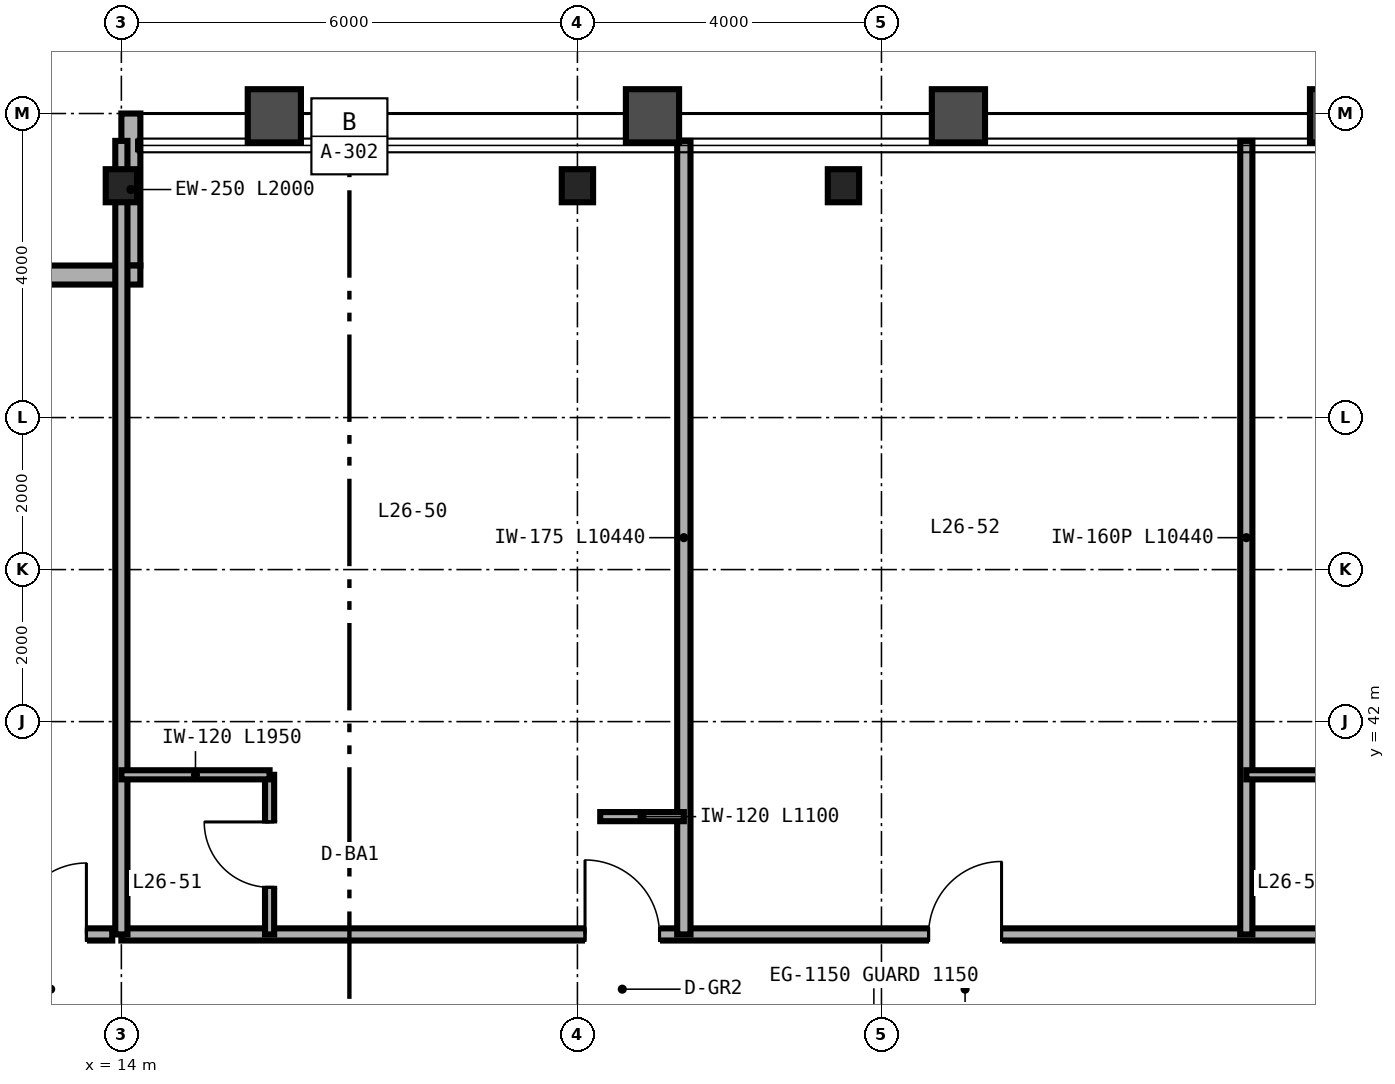
"""IFC4 building model, lengths in metres.
Left out: names, types, materials, properties, quantities, classifications, styles, units other than length and angle.
Written with IfcOpenShell. Run it as: python <this file> out.ifc"""

import sys

from ifc_helpers import new_model, si_unit, direction, frame, frame_2d, origin, origin_2d, place, context, subcontext, project, spatial, rectangle, i_section, extrude, source, transform, mapped, element, fill, save


model = new_model("IFC4")
c1 = context("Model", 3, precision=1e-05, world=origin(), true_north=direction((0.0, 1.0)))
c2 = subcontext(c1, "Body", "Model", "MODEL_VIEW")
j1 = project(units=[si_unit("LENGTHUNIT", "METRE"), si_unit("PLANEANGLEUNIT", "RADIAN")], contexts=[c1])
p1 = place(None, origin())
s1 = spatial("IfcSite", under=j1, at=p1, CompositionType="ELEMENT")
p2 = place(p1, origin())
s2 = spatial("IfcBuilding", under=s1, at=p2, CompositionType="ELEMENT")
p3 = place(p2, frame((0.0, 0.0, 108.0)))
s3 = spatial("IfcBuildingStorey", under=s2, at=p3, CompositionType="ELEMENT", Elevation=108.0)
m1 = source(origin(), c2, "Body", "SweptSolid", [
    extrude(i_section(OverallWidth=0.412, OverallDepth=0.435, WebThickness=0.036, FlangeThickness=0.057, FilletRadius=0.025, at=origin_2d()), origin(), (0.0, 0.0, 1.0), 3.36),
])
for number, where, z_axis, x_axis in (
    (1, (14.0, 49.05, 0.0), (0.0, 0.0, 1.0), (1.0, 0.0, 0.0)),
    (2, (20.0, 49.05, 0.0), (0.0, 0.0, 1.0), (1.0, 0.0, 0.0)),
    (3, (23.5, 49.05, 0.0), (0.0, 0.0, 1.0), (1.0, 0.0, 0.0)),
):
    element("IfcColumn", number, at=place(p3, frame(where, z_axis=z_axis, x_axis=x_axis)), inside=s3, PredefinedType="COLUMN", context=c2, shape_type="MappedRepresentation", body=[
        mapped(m1, transform((0.0, 0.0, 0.0), scale=1.0)),
    ])
p4 = place(p3, frame((14.125, 50.0, 0.0), z_axis=(0.0, 0.0, 1.0), x_axis=(0.0, -1.0, 0.0)))
e4 = element("IfcWall", 4, at=p4, inside=s3, PredefinedType="SOLIDWALL", context=c2, shape_type="SweptSolid", body=[
    extrude(rectangle(XDim=2.0, YDim=0.25, at=frame_2d((1.0, 0.0))), origin(), (0.0, 0.0, 1.0), 2.667),
])
p5 = place(p3, frame((14.25, 47.875, 0.0), z_axis=(0.0, 0.0, 1.0), x_axis=(-1.0, 0.0, 0.0)))
e5 = element("IfcWall", 5, at=p5, inside=s3, PredefinedType="SOLIDWALL", context=c2, shape_type="SweptSolid", body=[
    extrude(rectangle(XDim=2.0, YDim=0.25, at=frame_2d((1.0, 0.0))), origin(), (0.0, 0.0, 1.0), 3.36),
])
p6 = place(p3, frame((8.2, 39.2, 0.0), z_axis=(0.0, 0.0, 1.0), x_axis=(1.0, 0.0, 0.0)))
e6 = element("IfcWall", 6, at=p6, inside=s3, PredefinedType="PARTITIONING", context=c2, shape_type="SweptSolid", body=[
    extrude(rectangle(XDim=5.68, YDim=0.16, at=frame_2d((2.84, 0.0))), origin(), (0.0, 0.0, 1.0), 3.36),
])
p7 = place(p6, frame((4.4, 0.0, 0.0)))
e7 = element("IfcOpeningElement", 7, at=p7, cuts=e6, PredefinedType="OPENING", context=c2, shape_type="SweptSolid", body=[
    extrude(rectangle(XDim=0.94, YDim=2.15, at=frame_2d((0.47, 1.075))), frame((0.0, 0.09, 0.0), z_axis=(0.0, -1.0, 0.0), x_axis=(1.0, 0.0, 0.0)), (0.0, 0.0, 1.0), 0.18),
])
p8 = place(p3, frame((14.0, 39.2, 0.0), z_axis=(0.0, 0.0, 1.0), x_axis=(1.0, 0.0, 0.0)))
e8 = element("IfcWall", 8, at=p8, inside=s3, PredefinedType="PARTITIONING", context=c2, shape_type="SweptSolid", body=[
    extrude(rectangle(XDim=36.0, YDim=0.16, at=frame_2d((18.0, 0.0))), origin(), (0.0, 0.0, 1.0), 2.581),
])
p9 = place(p8, frame((6.1, 0.0, 0.0)))
e9 = element("IfcOpeningElement", 9, at=p9, cuts=e8, PredefinedType="OPENING", context=c2, shape_type="SweptSolid", body=[
    extrude(rectangle(XDim=0.98, YDim=2.2, at=frame_2d((0.49, 1.1))), frame((0.0, 0.09, 0.0), z_axis=(0.0, -1.0, 0.0), x_axis=(1.0, 0.0, 0.0)), (0.0, 0.0, 1.0), 0.18),
])
p10 = place(p8, frame((10.62, 0.0, 0.0)))
e10 = element("IfcOpeningElement", 10, at=p10, cuts=e8, PredefinedType="OPENING", context=c2, shape_type="SweptSolid", body=[
    extrude(rectangle(XDim=0.96, YDim=2.15, at=frame_2d((0.48, 1.075))), frame((0.0, 0.09, 0.0), z_axis=(0.0, -1.0, 0.0), x_axis=(1.0, 0.0, 0.0)), (0.0, 0.0, 1.0), 0.18),
])
p11 = place(p8, frame((21.1, 0.0, 0.0)))
e11 = element("IfcOpeningElement", 11, at=p11, cuts=e8, PredefinedType="OPENING", context=c2, shape_type="SweptSolid", body=[
    extrude(rectangle(XDim=0.98, YDim=2.2, at=frame_2d((0.49, 1.1))), frame((0.0, 0.09, 0.0), z_axis=(0.0, -1.0, 0.0), x_axis=(1.0, 0.0, 0.0)), (0.0, 0.0, 1.0), 0.18),
])
p12 = place(p8, frame((24.84, 0.0, 0.0)))
e12 = element("IfcOpeningElement", 12, at=p12, cuts=e8, PredefinedType="OPENING", context=c2, shape_type="SweptSolid", body=[
    extrude(rectangle(XDim=0.96, YDim=2.15, at=frame_2d((0.48, 1.075))), frame((0.0, 0.09, 0.0), z_axis=(0.0, -1.0, 0.0), x_axis=(1.0, 0.0, 0.0)), (0.0, 0.0, 1.0), 0.18),
])
p13 = place(p8, frame((34.74, 0.0, 0.0)))
e13 = element("IfcOpeningElement", 13, at=p13, cuts=e8, PredefinedType="OPENING", context=c2, shape_type="SweptSolid", body=[
    extrude(rectangle(XDim=0.94, YDim=2.15, at=frame_2d((0.47, 1.075))), frame((0.0, 0.09, 0.0), z_axis=(0.0, -1.0, 0.0), x_axis=(1.0, 0.0, 0.0)), (0.0, 0.0, 1.0), 0.18),
])
p14 = place(p3, frame((14.0, 39.2, 0.0), z_axis=(0.0, 0.0, 1.0), x_axis=(0.0, 1.0, 0.0)))
e14 = element("IfcWall", 14, at=p14, inside=s3, PredefinedType="PARTITIONING", context=c2, shape_type="SweptSolid", body=[
    extrude(rectangle(XDim=10.44, YDim=0.16, at=frame_2d((5.22, 0.0))), origin(), (0.0, 0.0, 1.0), 2.667),
])
p15 = place(p3, frame((21.4, 39.2, 0.0), z_axis=(0.0, 0.0, 1.0), x_axis=(0.0, 1.0, 0.0)))
e15 = element("IfcWall", 15, at=p15, inside=s3, PredefinedType="PARTITIONING", context=c2, shape_type="SweptSolid", body=[
    extrude(rectangle(XDim=10.44, YDim=0.175, at=frame_2d((5.22, 0.0))), origin(), (0.0, 0.0, 1.0), 2.823),
])
p16 = place(p3, frame((15.95, 39.2, 0.0), z_axis=(0.0, 0.0, 1.0), x_axis=(0.0, 1.0, 0.0)))
e16 = element("IfcWall", 16, at=p16, inside=s3, PredefinedType="PARTITIONING", context=c2, shape_type="SweptSolid", body=[
    extrude(rectangle(XDim=2.1, YDim=0.12, at=frame_2d((1.05, 0.0))), origin(), (0.0, 0.0, 1.0), 3.36),
])
p17 = place(p16, frame((0.62, 0.0, 0.0)))
e17 = element("IfcOpeningElement", 17, at=p17, cuts=e16, PredefinedType="OPENING", context=c2, shape_type="SweptSolid", body=[
    extrude(rectangle(XDim=0.86, YDim=2.1, at=frame_2d((0.43, 1.05))), frame((0.0, 0.07, 0.0), z_axis=(0.0, -1.0, 0.0), x_axis=(1.0, 0.0, 0.0)), (0.0, 0.0, 1.0), 0.14),
])
p18 = place(p3, frame((14.0, 41.3, 0.0), z_axis=(0.0, 0.0, 1.0), x_axis=(1.0, 0.0, 0.0)))
e18 = element("IfcWall", 18, at=p18, inside=s3, PredefinedType="PARTITIONING", context=c2, shape_type="SweptSolid", body=[
    extrude(rectangle(XDim=1.95, YDim=0.12, at=frame_2d((0.975, 0.0))), origin(), (0.0, 0.0, 1.0), 3.36),
])
p19 = place(p3, frame((20.3, 40.75, 0.0), z_axis=(0.0, 0.0, 1.0), x_axis=(1.0, 0.0, 0.0)))
e19 = element("IfcWall", 19, at=p19, inside=s3, PredefinedType="PARTITIONING", context=c2, shape_type="SweptSolid", body=[
    extrude(rectangle(XDim=1.1, YDim=0.12, at=frame_2d((0.55, 0.0))), origin(), (0.0, 0.0, 1.0), 3.36),
])
p20 = place(p3, frame((28.8, 39.2, 0.0), z_axis=(0.0, 0.0, 1.0), x_axis=(0.0, 1.0, 0.0)))
e20 = element("IfcWall", 20, at=p20, inside=s3, PredefinedType="PARTITIONING", context=c2, shape_type="SweptSolid", body=[
    extrude(rectangle(XDim=10.44, YDim=0.16, at=frame_2d((5.22, 0.0))), origin(), (0.0, 0.0, 1.0), 2.433),
])
p21 = place(p3, frame((28.8, 41.3, 0.0), z_axis=(0.0, 0.0, 1.0), x_axis=(1.0, 0.0, 0.0)))
e21 = element("IfcWall", 21, at=p21, inside=s3, PredefinedType="PARTITIONING", context=c2, shape_type="SweptSolid", body=[
    extrude(rectangle(XDim=1.95, YDim=0.12, at=frame_2d((0.975, 0.0))), origin(), (0.0, 0.0, 1.0), 3.36),
])
m2 = source(origin(), c2, "Body", "SweptSolid", [
    extrude(rectangle(XDim=0.94, YDim=2.15, at=frame_2d((0.47, 1.075))), frame((0.0, 0.025, 0.0), z_axis=(0.0, -1.0, 0.0), x_axis=(1.0, 0.0, 0.0)), (0.0, 0.0, 1.0), 0.05),
])
p22 = place(p7, origin())
e22 = element("IfcDoor", 22, at=p22, inside=s3, OperationType="SINGLE_SWING_RIGHT", PredefinedType="DOOR", context=c2, shape_type="MappedRepresentation", body=[
    mapped(m2, transform((0.0, 0.0, 0.0), scale=1.0)),
])
fill(e7, e22)
m3 = source(origin(), c2, "Body", "SweptSolid", [
    extrude(rectangle(XDim=0.86, YDim=2.1, at=frame_2d((0.43, 1.05))), frame((0.0, 0.025, 0.0), z_axis=(0.0, -1.0, 0.0), x_axis=(1.0, 0.0, 0.0)), (0.0, 0.0, 1.0), 0.05),
])
p23 = place(p17, origin())
e23 = element("IfcDoor", 23, at=p23, inside=s3, OperationType="SINGLE_SWING_RIGHT", PredefinedType="DOOR", context=c2, shape_type="MappedRepresentation", body=[
    mapped(m3, transform((0.0, 0.0, 0.0), scale=1.0)),
])
fill(e17, e23)
m4 = source(origin(), c2, "Body", "SweptSolid", [
    extrude(rectangle(XDim=0.98, YDim=2.2, at=frame_2d((0.49, 1.1))), frame((0.0, 0.025, 0.0), z_axis=(0.0, -1.0, 0.0), x_axis=(1.0, 0.0, 0.0)), (0.0, 0.0, 1.0), 0.05),
])
p24 = place(p9, origin())
e24 = element("IfcDoor", 24, at=p24, inside=s3, OperationType="SINGLE_SWING_LEFT", PredefinedType="DOOR", context=c2, shape_type="MappedRepresentation", body=[
    mapped(m4, transform((0.0, 0.0, 0.0), scale=1.0)),
])
fill(e9, e24)
m5 = source(origin(), c2, "Body", "SweptSolid", [
    extrude(rectangle(XDim=0.96, YDim=2.15, at=frame_2d((0.48, 1.075))), frame((0.0, 0.025, 0.0), z_axis=(0.0, -1.0, 0.0), x_axis=(1.0, 0.0, 0.0)), (0.0, 0.0, 1.0), 0.05),
])
p25 = place(p10, origin())
e25 = element("IfcDoor", 25, at=p25, inside=s3, OperationType="SINGLE_SWING_RIGHT", PredefinedType="DOOR", context=c2, shape_type="MappedRepresentation", body=[
    mapped(m5, transform((0.0, 0.0, 0.0), scale=1.0)),
])
fill(e10, e25)
save(model, sys.argv[1])
